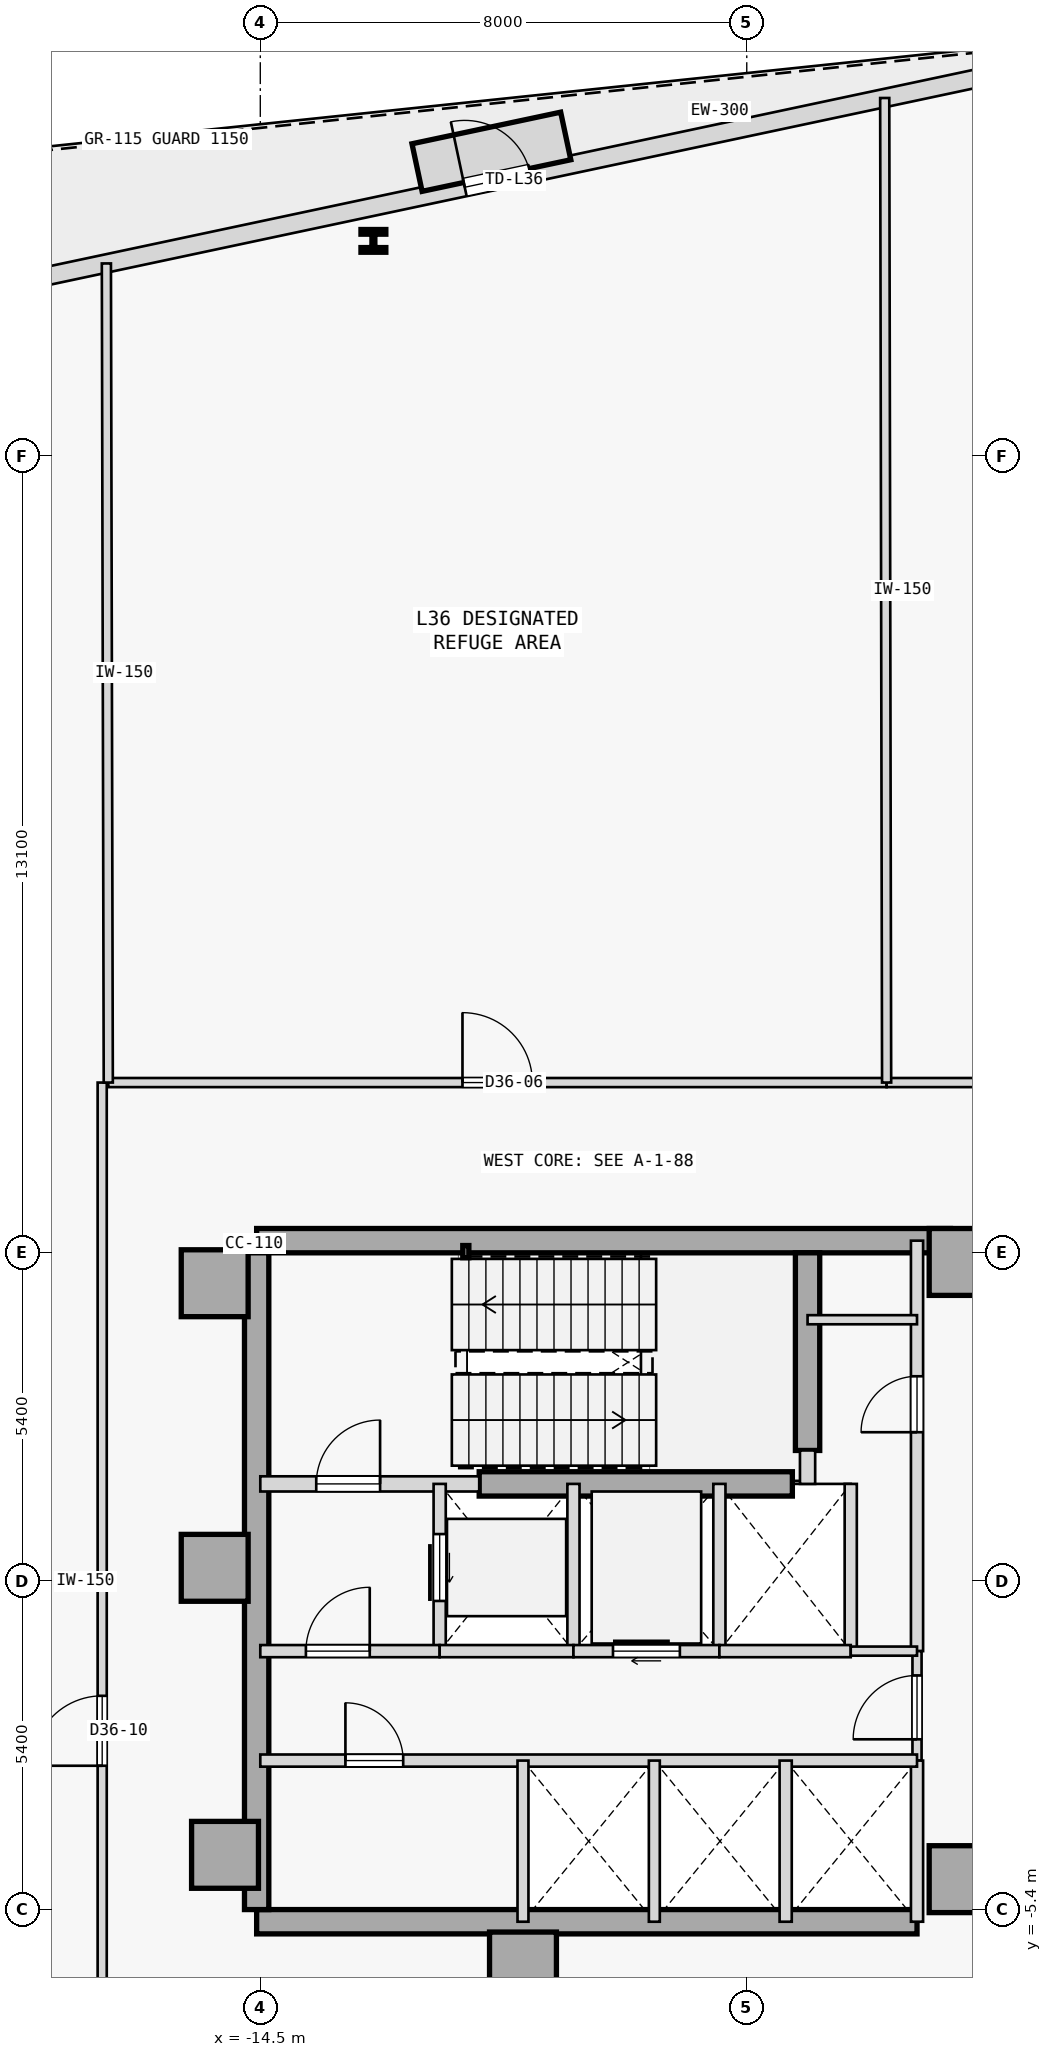
"""IFC4 building model, lengths in metres.
Left out: names, types, materials, properties, quantities, classifications, styles, units other than length and angle.
Written with IfcOpenShell. Run it as: python <this file> out.ifc"""

import sys

from ifc_helpers import new_model, si_unit, direction, frame, frame_2d, origin, origin_2d, place, context, subcontext, project, spatial, rectangle, hollow_rectangle, i_section, extrude, element, fill, save


model = new_model("IFC4")
c1 = context("Model", 3, precision=1e-05, world=origin(), true_north=direction((0.0, 1.0)))
c2 = subcontext(c1, "Body", "Model", "MODEL_VIEW")
j1 = project(units=[si_unit("LENGTHUNIT", "METRE"), si_unit("PLANEANGLEUNIT", "RADIAN")], contexts=[c1])
p1 = place(None, origin())
s1 = spatial("IfcSite", under=j1, at=p1, CompositionType="ELEMENT")
p2 = place(p1, origin())
s2 = spatial("IfcBuilding", under=s1, at=p2, CompositionType="ELEMENT")
p3 = place(p2, frame((0.0, 0.0, 142.9)))
s3 = spatial("IfcBuildingStorey", under=s2, at=p3, CompositionType="ELEMENT", Elevation=142.9)
for number, where, z_axis, x_axis in (
    (1, (-15.25, 4.9, 0.0), (0.0, 0.0, 1.0), (1.0, 0.0, 0.0)),
    (2, (-15.25, 0.22, 0.0), (0.0, 0.0, 1.0), (1.0, 0.0, 0.0)),
    (3, (-15.08, -4.5, 0.0), (0.0, 0.0, 1.0), (1.0, 0.0, 0.0)),
    (4, (-10.18, -6.32, 0.0), (0.0, 0.0, 1.0), (1.0, 0.0, 0.0)),
    (5, (-2.95, -4.9, 0.0), (0.0, 0.0, 1.0), (1.0, 0.0, 0.0)),
    (6, (-2.95, 5.25, 0.0), (0.0, 0.0, 1.0), (1.0, 0.0, 0.0)),
):
    element("IfcColumn", number, at=place(p3, frame(where, z_axis=z_axis, x_axis=x_axis)), inside=s3, PredefinedType="COLUMN", context=c2, shape_type="SweptSolid", body=[
        extrude(rectangle(XDim=1.1, YDim=1.1, at=origin_2d()), origin(), (0.0, 0.0, 1.0), 4.4),
    ])
p4 = place(p3, frame((-14.56, 5.6, 0.0), z_axis=(0.0, 0.0, 1.0), x_axis=(1.0, 0.0, 0.0)))
e7 = element("IfcWall", 7, at=p4, inside=s3, PredefinedType="SHEAR", context=c2, shape_type="SweptSolid", body=[
    extrude(rectangle(XDim=11.41, YDim=0.4, at=frame_2d((5.705, 0.0))), origin(), (0.0, 0.0, 1.0), 4.15),
])
p5 = place(p3, frame((-14.56, -5.6, 0.0), z_axis=(0.0, 0.0, 1.0), x_axis=(1.0, 0.0, 0.0)))
e8 = element("IfcWall", 8, at=p5, inside=s3, PredefinedType="SHEAR", context=c2, shape_type="SweptSolid", body=[
    extrude(rectangle(XDim=10.86, YDim=0.4, at=frame_2d((5.43, 0.0))), origin(), (0.0, 0.0, 1.0), 4.15),
])
p6 = place(p3, frame((-14.56, -5.4, 0.0), z_axis=(0.0, 0.0, 1.0), x_axis=(0.0, 1.0, 0.0)))
e9 = element("IfcWall", 9, at=p6, inside=s3, PredefinedType="SHEAR", context=c2, shape_type="SweptSolid", body=[
    extrude(rectangle(XDim=10.8, YDim=0.4, at=frame_2d((5.4, 0.0))), origin(), (0.0, 0.0, 1.0), 4.15),
])
p7 = place(p3, frame((-5.5, 2.15, 0.0), z_axis=(0.0, 0.0, 1.0), x_axis=(0.0, 1.0, 0.0)))
e10 = element("IfcWall", 10, at=p7, inside=s3, PredefinedType="SHEAR", context=c2, shape_type="SweptSolid", body=[
    extrude(rectangle(XDim=3.25, YDim=0.4, at=frame_2d((1.625, 0.0))), origin(), (0.0, 0.0, 1.0), 4.15),
])
p8 = place(p3, frame((-10.9, 1.6, 0.0), z_axis=(0.0, 0.0, 1.0), x_axis=(1.0, 0.0, 0.0)))
e11 = element("IfcWall", 11, at=p8, inside=s3, PredefinedType="SHEAR", context=c2, shape_type="SweptSolid", body=[
    extrude(rectangle(XDim=5.15, YDim=0.4, at=frame_2d((2.575, 0.0))), origin(), (0.0, 0.0, 1.0), 4.15),
])
p9 = place(p3, frame((-11.12, 5.42, 0.0), z_axis=(0.0, 0.0, 1.0), x_axis=(1.0, 0.0, 0.0)))
e12 = element("IfcColumn", 12, at=p9, inside=s3, PredefinedType="COLUMN", context=c2, shape_type="SweptSolid", body=[
    extrude(hollow_rectangle(XDim=0.1, YDim=0.2, WallThickness=0.008, at=origin_2d()), origin(), (0.0, 0.0, 1.0), 4.4),
])
p10 = place(p3, frame((-12.64, 22.042, 0.0), z_axis=(0.0, 0.0, 1.0), x_axis=(1.0, 0.0, 0.0)))
e13 = element("IfcColumn", 13, at=p10, inside=s3, PredefinedType="COLUMN", context=c2, shape_type="SweptSolid", body=[
    extrude(i_section(OverallWidth=0.409, OverallDepth=0.374, WebThickness=0.048, FlangeThickness=0.077, FilletRadius=0.015, at=origin_2d()), origin(), (0.0, 0.0, 1.0), 4.4),
])
p11 = place(p3, frame((22.822, 30.141, 0.0), z_axis=(0.0, 0.0, 1.0), x_axis=(-0.978147586603, -0.207911757299, 0.0)))
e14 = element("IfcWall", 14, at=p11, inside=s3, PredefinedType="STANDARD", context=c2, shape_type="SweptSolid", body=[
    extrude(rectangle(XDim=60.71, YDim=0.3, at=frame_2d((30.355, 0.0))), origin(), (0.0, 0.0, 1.0), 4.15),
])
p12 = place(p11, frame((33.618, 0.0, 0.0)))
e15 = element("IfcOpeningElement", 15, at=p12, cuts=e14, PredefinedType="OPENING", context=c2, shape_type="SweptSolid", body=[
    extrude(rectangle(XDim=1.1, YDim=2.2, at=frame_2d((0.55, 1.1))), frame((0.0, 0.16, 0.0), z_axis=(0.0, -1.0, 0.0), x_axis=(1.0, 0.0, 0.0)), (0.0, 0.0, 1.0), 0.32),
])
p13 = place(p3, frame((-14.5, 1.6, 0.0), z_axis=(0.0, 0.0, 1.0), x_axis=(1.0, 0.0, 0.0)))
e16 = element("IfcWall", 16, at=p13, inside=s3, PredefinedType="STANDARD", context=c2, shape_type="SweptSolid", body=[
    extrude(rectangle(XDim=3.6, YDim=0.25, at=frame_2d((1.8, 0.0))), origin(), (0.0, 0.0, 1.0), 4.15),
])
p14 = place(p13, frame((0.92, 0.0, 0.0)))
e17 = element("IfcOpeningElement", 17, at=p14, cuts=e16, PredefinedType="OPENING", context=c2, shape_type="SweptSolid", body=[
    extrude(rectangle(XDim=1.05, YDim=2.15, at=frame_2d((0.525, 1.075))), frame((0.0, 0.135, 0.0), z_axis=(0.0, -1.0, 0.0), x_axis=(1.0, 0.0, 0.0)), (0.0, 0.0, 1.0), 0.27),
])
p15 = place(p3, frame((-5.5, 1.6, 0.0), z_axis=(0.0, 0.0, 1.0), x_axis=(0.0, 1.0, 0.0)))
e18 = element("IfcWall", 18, at=p15, inside=s3, PredefinedType="STANDARD", context=c2, shape_type="SweptSolid", body=[
    extrude(rectangle(XDim=0.55, YDim=0.25, at=frame_2d((0.275, 0.0))), origin(), (0.0, 0.0, 1.0), 4.15),
])
p16 = place(p3, frame((-3.7, -1.15, 0.0), z_axis=(0.0, 0.0, 1.0), x_axis=(0.0, 1.0, 0.0)))
e19 = element("IfcWall", 19, at=p16, inside=s3, PredefinedType="STANDARD", context=c2, shape_type="SweptSolid", body=[
    extrude(rectangle(XDim=6.75, YDim=0.2, at=frame_2d((3.375, 0.0))), origin(), (0.0, 0.0, 1.0), 4.15),
])
p17 = place(p16, frame((3.6, 0.0, 0.0)))
e20 = element("IfcOpeningElement", 20, at=p17, cuts=e19, PredefinedType="OPENING", context=c2, shape_type="SweptSolid", body=[
    extrude(rectangle(XDim=0.92, YDim=2.15, at=frame_2d((0.46, 1.075))), frame((0.0, 0.11, 0.0), z_axis=(0.0, -1.0, 0.0), x_axis=(1.0, 0.0, 0.0)), (0.0, 0.0, 1.0), 0.22),
])
p18 = place(p3, frame((-3.7, -2.95, 0.0), z_axis=(0.0, 0.0, 1.0), x_axis=(0.0, 1.0, 0.0)))
e21 = element("IfcWall", 21, at=p18, inside=s3, PredefinedType="PARTITIONING", context=c2, shape_type="SweptSolid", body=[
    extrude(rectangle(XDim=1.8, YDim=0.15, at=frame_2d((0.9, 0.0))), origin(), (0.0, 0.0, 1.0), 4.15),
])
p19 = place(p18, frame((0.35, 0.0, 0.0)))
e22 = element("IfcOpeningElement", 22, at=p19, cuts=e21, PredefinedType="OPENING", context=c2, shape_type="SweptSolid", body=[
    extrude(rectangle(XDim=1.05, YDim=2.18, at=frame_2d((0.525, 1.09))), frame((0.0, 0.085, 0.0), z_axis=(0.0, -1.0, 0.0), x_axis=(1.0, 0.0, 0.0)), (0.0, 0.0, 1.0), 0.17),
])
p20 = place(p3, frame((-3.7, -5.6, 0.0), z_axis=(0.0, 0.0, 1.0), x_axis=(0.0, 1.0, 0.0)))
e23 = element("IfcWall", 23, at=p20, inside=s3, PredefinedType="STANDARD", context=c2, shape_type="SweptSolid", body=[
    extrude(rectangle(XDim=2.65, YDim=0.2, at=frame_2d((1.325, 0.0))), origin(), (0.0, 0.0, 1.0), 4.15),
])
p21 = place(p3, frame((-11.55, -1.15, 0.0), z_axis=(0.0, 0.0, 1.0), x_axis=(0.0, 1.0, 0.0)))
e24 = element("IfcWall", 24, at=p21, inside=s3, PredefinedType="STANDARD", context=c2, shape_type="SweptSolid", body=[
    extrude(rectangle(XDim=2.75, YDim=0.2, at=frame_2d((1.375, 0.0))), origin(), (0.0, 0.0, 1.0), 4.15),
])
p22 = place(p21, frame((0.825, 0.0, 0.0)))
e25 = element("IfcOpeningElement", 25, at=p22, cuts=e24, PredefinedType="OPENING", context=c2, shape_type="SweptSolid", body=[
    extrude(rectangle(XDim=1.1, YDim=2.15, at=frame_2d((0.55, 1.075))), frame((0.0, 0.11, 0.0), z_axis=(0.0, -1.0, 0.0), x_axis=(1.0, 0.0, 0.0)), (0.0, 0.0, 1.0), 0.22),
])
p23 = place(p3, frame((-9.35, -1.15, 0.0), z_axis=(0.0, 0.0, 1.0), x_axis=(0.0, 1.0, 0.0)))
e26 = element("IfcWall", 26, at=p23, inside=s3, PredefinedType="STANDARD", context=c2, shape_type="SweptSolid", body=[
    extrude(rectangle(XDim=2.75, YDim=0.2, at=frame_2d((1.375, 0.0))), origin(), (0.0, 0.0, 1.0), 4.15),
])
p24 = place(p3, frame((-14.5, -1.15, 0.0), z_axis=(0.0, 0.0, 1.0), x_axis=(1.0, 0.0, 0.0)))
e27 = element("IfcWall", 27, at=p24, inside=s3, PredefinedType="STANDARD", context=c2, shape_type="SweptSolid", body=[
    extrude(rectangle(XDim=2.95, YDim=0.2, at=frame_2d((1.475, 0.0))), origin(), (0.0, 0.0, 1.0), 4.15),
])
p25 = place(p24, frame((0.75, 0.0, 0.0)))
e28 = element("IfcOpeningElement", 28, at=p25, cuts=e27, PredefinedType="OPENING", context=c2, shape_type="SweptSolid", body=[
    extrude(rectangle(XDim=1.05, YDim=2.18, at=frame_2d((0.525, 1.09))), frame((0.0, 0.11, 0.0), z_axis=(0.0, -1.0, 0.0), x_axis=(1.0, 0.0, 0.0)), (0.0, 0.0, 1.0), 0.22),
])
p26 = place(p3, frame((-11.55, -1.15, 0.0), z_axis=(0.0, 0.0, 1.0), x_axis=(1.0, 0.0, 0.0)))
e29 = element("IfcWall", 29, at=p26, inside=s3, PredefinedType="STANDARD", context=c2, shape_type="SweptSolid", body=[
    extrude(rectangle(XDim=2.2, YDim=0.2, at=frame_2d((1.1, 0.0))), origin(), (0.0, 0.0, 1.0), 4.15),
])
p27 = place(p3, frame((-6.95, -1.15, 0.0), z_axis=(0.0, 0.0, 1.0), x_axis=(0.0, 1.0, 0.0)))
e30 = element("IfcWall", 30, at=p27, inside=s3, PredefinedType="STANDARD", context=c2, shape_type="SweptSolid", body=[
    extrude(rectangle(XDim=2.75, YDim=0.2, at=frame_2d((1.375, 0.0))), origin(), (0.0, 0.0, 1.0), 4.15),
])
p28 = place(p3, frame((-9.35, -1.15, 0.0), z_axis=(0.0, 0.0, 1.0), x_axis=(1.0, 0.0, 0.0)))
e31 = element("IfcWall", 31, at=p28, inside=s3, PredefinedType="STANDARD", context=c2, shape_type="SweptSolid", body=[
    extrude(rectangle(XDim=2.4, YDim=0.2, at=frame_2d((1.2, 0.0))), origin(), (0.0, 0.0, 1.0), 4.15),
])
p29 = place(p28, frame((0.65, 0.0, 0.0)))
e32 = element("IfcOpeningElement", 32, at=p29, cuts=e31, PredefinedType="OPENING", context=c2, shape_type="SweptSolid", body=[
    extrude(rectangle(XDim=1.1, YDim=2.15, at=frame_2d((0.55, 1.075))), frame((0.0, 0.11, 0.0), z_axis=(0.0, -1.0, 0.0), x_axis=(1.0, 0.0, 0.0)), (0.0, 0.0, 1.0), 0.22),
])
p30 = place(p3, frame((-4.79, -1.15, 0.0), z_axis=(0.0, 0.0, 1.0), x_axis=(0.0, 1.0, 0.0)))
e33 = element("IfcWall", 33, at=p30, inside=s3, PredefinedType="STANDARD", context=c2, shape_type="SweptSolid", body=[
    extrude(rectangle(XDim=2.75, YDim=0.2, at=frame_2d((1.375, 0.0))), origin(), (0.0, 0.0, 1.0), 4.15),
])
p31 = place(p3, frame((-6.95, -1.15, 0.0), z_axis=(0.0, 0.0, 1.0), x_axis=(1.0, 0.0, 0.0)))
e34 = element("IfcWall", 34, at=p31, inside=s3, PredefinedType="STANDARD", context=c2, shape_type="SweptSolid", body=[
    extrude(rectangle(XDim=2.16, YDim=0.2, at=frame_2d((1.08, 0.0))), origin(), (0.0, 0.0, 1.0), 4.15),
])
p32 = place(p3, frame((-4.79, -1.15, 0.0), z_axis=(0.0, 0.0, 1.0), x_axis=(1.0, 0.0, 0.0)))
e35 = element("IfcWall", 35, at=p32, inside=s3, PredefinedType="PARTITIONING", context=c2, shape_type="SweptSolid", body=[
    extrude(rectangle(XDim=1.09, YDim=0.15, at=frame_2d((0.545, 0.0))), origin(), (0.0, 0.0, 1.0), 4.15),
])
p33 = place(p3, frame((-14.5, -2.95, 0.0), z_axis=(0.0, 0.0, 1.0), x_axis=(1.0, 0.0, 0.0)))
e36 = element("IfcWall", 36, at=p33, inside=s3, PredefinedType="STANDARD", context=c2, shape_type="SweptSolid", body=[
    extrude(rectangle(XDim=10.8, YDim=0.2, at=frame_2d((5.4, 0.0))), origin(), (0.0, 0.0, 1.0), 4.15),
])
p34 = place(p33, frame((1.4, 0.0, 0.0)))
e37 = element("IfcOpeningElement", 37, at=p34, cuts=e36, PredefinedType="OPENING", context=c2, shape_type="SweptSolid", body=[
    extrude(rectangle(XDim=0.95, YDim=2.15, at=frame_2d((0.475, 1.075))), frame((0.0, 0.11, 0.0), z_axis=(0.0, -1.0, 0.0), x_axis=(1.0, 0.0, 0.0)), (0.0, 0.0, 1.0), 0.22),
])
p35 = place(p3, frame((-5.86, -5.6, 0.0), z_axis=(0.0, 0.0, 1.0), x_axis=(0.0, 1.0, 0.0)))
e38 = element("IfcWall", 38, at=p35, inside=s3, PredefinedType="STANDARD", context=c2, shape_type="SweptSolid", body=[
    extrude(rectangle(XDim=2.65, YDim=0.2, at=frame_2d((1.325, 0.0))), origin(), (0.0, 0.0, 1.0), 4.15),
])
for number, where, z_axis, x_axis in (
    (39, (-10.18, -5.6, 0.0), (0.0, 0.0, 1.0), (0.0, 1.0, 0.0)),
    (40, (-8.02, -5.6, 0.0), (0.0, 0.0, 1.0), (0.0, 1.0, 0.0)),
):
    element("IfcWall", number, at=place(p3, frame(where, z_axis=z_axis, x_axis=x_axis)), inside=s3, PredefinedType="STANDARD", context=c2, shape_type="SweptSolid", body=[
        extrude(rectangle(XDim=2.65, YDim=0.18, at=frame_2d((1.325, 0.0))), origin(), (0.0, 0.0, 1.0), 4.15),
    ])
p36 = place(p3, frame((-5.5, 4.3, 0.0), z_axis=(0.0, 0.0, 1.0), x_axis=(1.0, 0.0, 0.0)))
e41 = element("IfcWall", 41, at=p36, inside=s3, PredefinedType="PARTITIONING", context=c2, shape_type="SweptSolid", body=[
    extrude(rectangle(XDim=1.8, YDim=0.15, at=frame_2d((0.9, 0.0))), origin(), (0.0, 0.0, 1.0), 4.15),
])
p37 = place(p3, frame((-17.0, 8.2, 0.0), z_axis=(0.0, 0.0, 1.0), x_axis=(1.0, 0.0, 0.0)))
e42 = element("IfcWall", 42, at=p37, inside=s3, PredefinedType="PARTITIONING", context=c2, shape_type="SweptSolid", body=[
    extrude(rectangle(XDim=12.8, YDim=0.15, at=frame_2d((6.4, 0.0))), origin(), (0.0, 0.0, 1.0), 4.15),
])
p38 = place(p37, frame((5.825, 0.0, 0.0)))
e43 = element("IfcOpeningElement", 43, at=p38, cuts=e42, PredefinedType="OPENING", context=c2, shape_type="SweptSolid", body=[
    extrude(rectangle(XDim=1.15, YDim=2.15, at=frame_2d((0.575, 1.075))), frame((0.0, 0.085, 0.0), z_axis=(0.0, -1.0, 0.0), x_axis=(1.0, 0.0, 0.0)), (0.0, 0.0, 1.0), 0.17),
])
p39 = place(p3, frame((-4.2, 8.2, 0.0), z_axis=(0.0, 0.0, 1.0), x_axis=(1.0, 0.0, 0.0)))
e44 = element("IfcWall", 44, at=p39, inside=s3, PredefinedType="PARTITIONING", context=c2, shape_type="SweptSolid", body=[
    extrude(rectangle(XDim=21.3, YDim=0.15, at=frame_2d((10.65, 0.0))), origin(), (0.0, 0.0, 1.0), 4.15),
])
p40 = place(p39, frame((10.075, 0.0, 0.0)))
e45 = element("IfcOpeningElement", 45, at=p40, cuts=e44, PredefinedType="OPENING", context=c2, shape_type="SweptSolid", body=[
    extrude(rectangle(XDim=1.15, YDim=2.15, at=frame_2d((0.575, 1.075))), frame((0.0, 0.085, 0.0), z_axis=(0.0, -1.0, 0.0), x_axis=(1.0, 0.0, 0.0)), (0.0, 0.0, 1.0), 0.17),
])
p41 = place(p3, frame((-17.1, -8.2, 0.0), z_axis=(0.0, 0.0, 1.0), x_axis=(0.0, 1.0, 0.0)))
e46 = element("IfcWall", 46, at=p41, inside=s3, PredefinedType="PARTITIONING", context=c2, shape_type="SweptSolid", body=[
    extrude(rectangle(XDim=16.4, YDim=0.15, at=frame_2d((8.2, 0.0))), origin(), (0.0, 0.0, 1.0), 4.15),
])
p42 = place(p41, frame((5.165, 0.0, 0.0)))
e47 = element("IfcOpeningElement", 47, at=p42, cuts=e46, PredefinedType="OPENING", context=c2, shape_type="SweptSolid", body=[
    extrude(rectangle(XDim=1.15, YDim=2.15, at=frame_2d((0.575, 1.075))), frame((0.0, 0.085, 0.0), z_axis=(0.0, -1.0, 0.0), x_axis=(1.0, 0.0, 0.0)), (0.0, 0.0, 1.0), 0.17),
])
p43 = place(p3, frame((-4.2, 8.2, 0.0), z_axis=(0.0, 0.0, 1.0), x_axis=(-0.001930061696, 0.999998137429, 0.0)))
e48 = element("IfcWall", 48, at=p43, inside=s3, PredefinedType="PARTITIONING", context=c2, shape_type="SweptSolid", body=[
    extrude(rectangle(XDim=16.191, YDim=0.15, at=frame_2d((8.096, 0.0))), origin(), (0.0, 0.0, 1.0), 4.15),
])
p44 = place(p3, frame((-17.0, 8.2, 0.0), z_axis=(0.0, 0.0, 1.0), x_axis=(-0.002301761007, 0.999997350945, 0.0)))
e49 = element("IfcWall", 49, at=p44, inside=s3, PredefinedType="PARTITIONING", context=c2, shape_type="SweptSolid", body=[
    extrude(rectangle(XDim=13.47, YDim=0.15, at=frame_2d((6.735, 0.0))), origin(), (0.0, 0.0, 1.0), 4.15),
])
p45 = place(p12, frame((1.1, 0.0, 0.0), z_axis=(0.0, 0.0, 1.0), x_axis=(-1.0, 0.0, 0.0)))
e50 = element("IfcDoor", 50, at=p45, inside=s3, OperationType="SINGLE_SWING_RIGHT", PredefinedType="DOOR", context=c2, shape_type="SweptSolid", body=[
    extrude(rectangle(XDim=1.1, YDim=2.2, at=frame_2d((0.55, 1.1))), frame((0.0, 0.025, 0.0), z_axis=(0.0, -1.0, 0.0), x_axis=(1.0, 0.0, 0.0)), (0.0, 0.0, 1.0), 0.05),
])
fill(e15, e50)
p46 = place(p14, origin())
e51 = element("IfcDoor", 51, at=p46, inside=s3, OperationType="SINGLE_SWING_RIGHT", PredefinedType="DOOR", context=c2, shape_type="SweptSolid", body=[
    extrude(rectangle(XDim=1.05, YDim=2.15, at=frame_2d((0.525, 1.075))), frame((0.0, 0.025, 0.0), z_axis=(0.0, -1.0, 0.0), x_axis=(1.0, 0.0, 0.0)), (0.0, 0.0, 1.0), 0.05),
])
fill(e17, e51)
p47 = place(p25, origin())
e52 = element("IfcDoor", 52, at=p47, inside=s3, OperationType="SINGLE_SWING_RIGHT", PredefinedType="DOOR", context=c2, shape_type="SweptSolid", body=[
    extrude(rectangle(XDim=1.05, YDim=2.18, at=frame_2d((0.525, 1.09))), frame((0.0, 0.025, 0.0), z_axis=(0.0, -1.0, 0.0), x_axis=(1.0, 0.0, 0.0)), (0.0, 0.0, 1.0), 0.05),
])
fill(e28, e52)
p48 = place(p19, origin())
e53 = element("IfcDoor", 53, at=p48, inside=s3, OperationType="SINGLE_SWING_LEFT", PredefinedType="DOOR", context=c2, shape_type="SweptSolid", body=[
    extrude(rectangle(XDim=1.05, YDim=2.18, at=frame_2d((0.525, 1.09))), frame((0.0, 0.025, 0.0), z_axis=(0.0, -1.0, 0.0), x_axis=(1.0, 0.0, 0.0)), (0.0, 0.0, 1.0), 0.05),
])
fill(e22, e53)
p49 = place(p22, origin())
e54 = element("IfcDoor", 54, at=p49, inside=s3, OperationType="SLIDING_TO_RIGHT", PredefinedType="DOOR", context=c2, shape_type="SweptSolid", body=[
    extrude(rectangle(XDim=1.1, YDim=2.15, at=frame_2d((0.55, 1.075))), frame((0.0, 0.025, 0.0), z_axis=(0.0, -1.0, 0.0), x_axis=(1.0, 0.0, 0.0)), (0.0, 0.0, 1.0), 0.05),
])
fill(e25, e54)
p50 = place(p29, origin())
e55 = element("IfcDoor", 55, at=p50, inside=s3, OperationType="SLIDING_TO_RIGHT", PredefinedType="DOOR", context=c2, shape_type="SweptSolid", body=[
    extrude(rectangle(XDim=1.1, YDim=2.15, at=frame_2d((0.55, 1.075))), frame((0.0, 0.025, 0.0), z_axis=(0.0, -1.0, 0.0), x_axis=(1.0, 0.0, 0.0)), (0.0, 0.0, 1.0), 0.05),
])
fill(e32, e55)
p51 = place(p34, origin())
e56 = element("IfcDoor", 56, at=p51, inside=s3, OperationType="SINGLE_SWING_LEFT", PredefinedType="DOOR", context=c2, shape_type="SweptSolid", body=[
    extrude(rectangle(XDim=0.95, YDim=2.15, at=frame_2d((0.475, 1.075))), frame((0.0, 0.025, 0.0), z_axis=(0.0, -1.0, 0.0), x_axis=(1.0, 0.0, 0.0)), (0.0, 0.0, 1.0), 0.05),
])
fill(e37, e56)
p52 = place(p17, origin())
e57 = element("IfcDoor", 57, at=p52, inside=s3, OperationType="SINGLE_SWING_LEFT", PredefinedType="DOOR", context=c2, shape_type="SweptSolid", body=[
    extrude(rectangle(XDim=0.92, YDim=2.15, at=frame_2d((0.46, 1.075))), frame((0.0, 0.025, 0.0), z_axis=(0.0, -1.0, 0.0), x_axis=(1.0, 0.0, 0.0)), (0.0, 0.0, 1.0), 0.05),
])
fill(e20, e57)
p53 = place(p38, origin())
e58 = element("IfcDoor", 58, at=p53, inside=s3, OperationType="SINGLE_SWING_LEFT", PredefinedType="DOOR", context=c2, shape_type="SweptSolid", body=[
    extrude(rectangle(XDim=1.15, YDim=2.15, at=frame_2d((0.575, 1.075))), frame((0.0, 0.025, 0.0), z_axis=(0.0, -1.0, 0.0), x_axis=(1.0, 0.0, 0.0)), (0.0, 0.0, 1.0), 0.05),
])
fill(e43, e58)
p54 = place(p42, origin())
e59 = element("IfcDoor", 59, at=p54, inside=s3, OperationType="SINGLE_SWING_LEFT", PredefinedType="DOOR", context=c2, shape_type="SweptSolid", body=[
    extrude(rectangle(XDim=1.15, YDim=2.15, at=frame_2d((0.575, 1.075))), frame((0.0, 0.025, 0.0), z_axis=(0.0, -1.0, 0.0), x_axis=(1.0, 0.0, 0.0)), (0.0, 0.0, 1.0), 0.05),
])
fill(e47, e59)
save(model, sys.argv[1])
